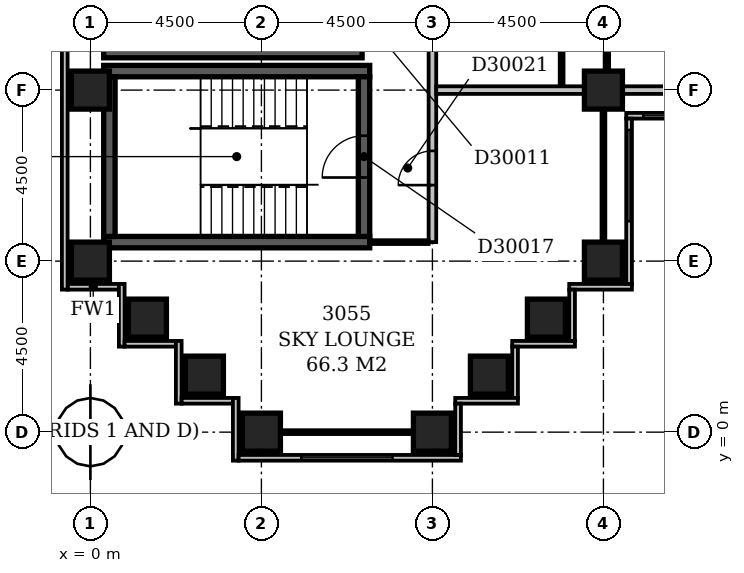
"""IFC4 building model, lengths in metres.
Left out: names, types, materials, properties, quantities, classifications, styles, units other than length and angle.
Written with IfcOpenShell. Run it as: python <this file> out.ifc"""

import sys

from ifc_helpers import new_model, si_unit, direction, frame, frame_2d, origin, origin_2d, place, context, subcontext, project, spatial, rectangle, extrude, element, fill, save


model = new_model("IFC4")
c1 = context("Model", 3, precision=1e-05, world=origin(), true_north=direction((0.0, 1.0)))
c2 = subcontext(c1, "Body", "Model", "MODEL_VIEW")
j1 = project(units=[si_unit("LENGTHUNIT", "METRE"), si_unit("PLANEANGLEUNIT", "RADIAN")], contexts=[c1])
p1 = place(None, origin())
s1 = spatial("IfcSite", under=j1, at=p1, CompositionType="ELEMENT")
p2 = place(p1, origin())
s2 = spatial("IfcBuilding", under=s1, at=p2, CompositionType="ELEMENT")
p3 = place(p2, frame((0.0, 0.0, 123.2)))
s3 = spatial("IfcBuildingStorey", under=s2, at=p3, CompositionType="ELEMENT", Elevation=123.2)
for number, where, z_axis, x_axis in (
    (1, (0.35, 5.0, -0.3), (0.0, 0.0, 1.0), (1.0, 0.0, 0.0)),
    (2, (0.35, 9.5, -0.3), (0.0, 0.0, 1.0), (1.0, 0.0, 0.0)),
):
    element("IfcWall", number, at=place(p3, frame(where, z_axis=z_axis, x_axis=x_axis)), inside=s3, PredefinedType="SHEAR", context=c2, shape_type="SweptSolid", body=[
        extrude(rectangle(XDim=7.0, YDim=0.3, at=frame_2d((3.5, 0.0))), origin(), (0.0, 0.0, 1.0), 3.6),
    ])
p4 = place(p3, frame((0.35, 10.0, -0.3), z_axis=(0.0, 0.0, 1.0), x_axis=(1.0, 0.0, 0.0)))
e3 = element("IfcWall", 3, at=p4, inside=s3, PredefinedType="SHEAR", context=c2, shape_type="SweptSolid", body=[
    extrude(rectangle(XDim=6.8, YDim=0.3, at=frame_2d((3.4, 0.0))), origin(), (0.0, 0.0, 1.0), 3.6),
])
p5 = place(p3, frame((0.5, 5.15, -0.3), z_axis=(0.0, 0.0, 1.0), x_axis=(0.0, 1.0, 0.0)))
e4 = element("IfcWall", 4, at=p5, inside=s3, PredefinedType="SHEAR", context=c2, shape_type="SweptSolid", body=[
    extrude(rectangle(XDim=4.2, YDim=0.3, at=frame_2d((2.1, 0.0))), origin(), (0.0, 0.0, 1.0), 3.6),
])
p6 = place(p3, frame((7.2, 5.15, -0.3), z_axis=(0.0, 0.0, 1.0), x_axis=(0.0, 1.0, 0.0)))
e5 = element("IfcWall", 5, at=p6, inside=s3, PredefinedType="SHEAR", context=c2, shape_type="SweptSolid", body=[
    extrude(rectangle(XDim=4.2, YDim=0.3, at=frame_2d((2.1, 0.0))), origin(), (0.0, 0.0, 1.0), 3.6),
])
p7 = place(p6, frame((1.55, 0.0, 0.3)))
e6 = element("IfcOpeningElement", 6, at=p7, cuts=e5, PredefinedType="OPENING", context=c2, shape_type="SweptSolid", body=[
    extrude(rectangle(XDim=1.1, YDim=2.1, at=frame_2d((0.55, 1.05))), frame((0.0, 0.162, 0.0), z_axis=(0.0, -1.0, 0.0), x_axis=(1.0, 0.0, 0.0)), (0.0, 0.0, 1.0), 0.324),
])
for number, where, z_axis, x_axis in (
    (7, (4.5, 0.0, -0.3), (0.0, 0.0, 1.0), (1.0, 0.0, 0.0)),
    (8, (9.0, 0.0, -0.3), (0.0, 0.0, 1.0), (1.0, 0.0, 0.0)),
    (9, (3.0, 1.5, -0.3), (0.0, 0.0, 1.0), (1.0, 0.0, 0.0)),
    (10, (10.5, 1.5, -0.3), (0.0, 0.0, 1.0), (1.0, 0.0, 0.0)),
    (11, (1.5, 3.0, -0.3), (0.0, 0.0, 1.0), (1.0, 0.0, 0.0)),
    (12, (12.0, 3.0, -0.3), (0.0, 0.0, 1.0), (1.0, 0.0, 0.0)),
    (13, (0.0, 4.5, -0.3), (0.0, 0.0, 1.0), (1.0, 0.0, 0.0)),
    (14, (13.5, 4.5, -0.3), (0.0, 0.0, 1.0), (1.0, 0.0, 0.0)),
    (15, (0.0, 9.0, -0.3), (0.0, 0.0, 1.0), (1.0, 0.0, 0.0)),
    (16, (13.5, 9.0, -0.3), (0.0, 0.0, 1.0), (1.0, 0.0, 0.0)),
):
    element("IfcColumn", number, at=place(p3, frame(where, z_axis=z_axis, x_axis=x_axis)), inside=s3, PredefinedType="COLUMN", context=c2, shape_type="SweptSolid", body=[
        extrude(rectangle(XDim=1.0, YDim=1.0, at=origin_2d()), origin(), (0.0, 0.0, 1.0), 3.6),
    ])
p8 = place(p3, frame((9.675, -0.6, 0.0), z_axis=(0.0, 0.0, 1.0), x_axis=(0.0, 1.0, 0.0)))
e17 = element("IfcWall", 17, at=p8, inside=s3, PredefinedType="STANDARD", context=c2, shape_type="SweptSolid", body=[
    extrude(rectangle(XDim=1.35, YDim=0.15, at=frame_2d((0.675, 0.0))), origin(), (0.0, 0.0, 1.0), 2.7),
])
p9 = place(p3, frame((9.6, 0.825, 0.0), z_axis=(0.0, 0.0, 1.0), x_axis=(1.0, 0.0, 0.0)))
e18 = element("IfcWall", 18, at=p9, inside=s3, PredefinedType="STANDARD", context=c2, shape_type="SweptSolid", body=[
    extrude(rectangle(XDim=1.65, YDim=0.15, at=frame_2d((0.825, 0.0))), origin(), (0.0, 0.0, 1.0), 2.7),
])
p10 = place(p3, frame((11.175, 0.9, 0.0), z_axis=(0.0, 0.0, 1.0), x_axis=(0.0, 1.0, 0.0)))
e19 = element("IfcWall", 19, at=p10, inside=s3, PredefinedType="STANDARD", context=c2, shape_type="SweptSolid", body=[
    extrude(rectangle(XDim=1.35, YDim=0.15, at=frame_2d((0.675, 0.0))), origin(), (0.0, 0.0, 1.0), 2.7),
])
p11 = place(p3, frame((11.1, 2.325, 0.0), z_axis=(0.0, 0.0, 1.0), x_axis=(1.0, 0.0, 0.0)))
e20 = element("IfcWall", 20, at=p11, inside=s3, PredefinedType="STANDARD", context=c2, shape_type="SweptSolid", body=[
    extrude(rectangle(XDim=1.65, YDim=0.15, at=frame_2d((0.825, 0.0))), origin(), (0.0, 0.0, 1.0), 2.7),
])
p12 = place(p3, frame((12.675, 2.4, 0.0), z_axis=(0.0, 0.0, 1.0), x_axis=(0.0, 1.0, 0.0)))
e21 = element("IfcWall", 21, at=p12, inside=s3, PredefinedType="STANDARD", context=c2, shape_type="SweptSolid", body=[
    extrude(rectangle(XDim=1.35, YDim=0.15, at=frame_2d((0.675, 0.0))), origin(), (0.0, 0.0, 1.0), 2.7),
])
p13 = place(p3, frame((12.6, 3.825, 0.0), z_axis=(0.0, 0.0, 1.0), x_axis=(1.0, 0.0, 0.0)))
e22 = element("IfcWall", 22, at=p13, inside=s3, PredefinedType="STANDARD", context=c2, shape_type="SweptSolid", body=[
    extrude(rectangle(XDim=1.65, YDim=0.15, at=frame_2d((0.825, 0.0))), origin(), (0.0, 0.0, 1.0), 2.7),
])
p14 = place(p3, frame((14.175, 3.9, 0.0), z_axis=(0.0, 0.0, 1.0), x_axis=(0.0, 1.0, 0.0)))
e23 = element("IfcWall", 23, at=p14, inside=s3, PredefinedType="STANDARD", context=c2, shape_type="SweptSolid", body=[
    extrude(rectangle(XDim=4.35, YDim=0.15, at=frame_2d((2.175, 0.0))), origin(), (0.0, 0.0, 1.0), 2.7),
])
p15 = place(p14, frame((1.65, 0.0, 0.6)))
e24 = element("IfcOpeningElement", 24, at=p15, cuts=e23, PredefinedType="OPENING", context=c2, shape_type="SweptSolid", body=[
    extrude(rectangle(XDim=2.4, YDim=1.8, at=frame_2d((1.2, 0.9))), frame((0.0, 0.087, 0.0), z_axis=(0.0, -1.0, 0.0), x_axis=(1.0, 0.0, 0.0)), (0.0, 0.0, 1.0), 0.174),
])
p16 = place(p3, frame((14.1, 8.325, 0.0), z_axis=(0.0, 0.0, 1.0), x_axis=(1.0, 0.0, 0.0)))
e25 = element("IfcWall", 25, at=p16, inside=s3, PredefinedType="STANDARD", context=c2, shape_type="SweptSolid", body=[
    extrude(rectangle(XDim=4.65, YDim=0.15, at=frame_2d((2.325, 0.0))), origin(), (0.0, 0.0, 1.0), 2.7),
])
p17 = place(p16, frame((0.45, 0.0, 0.6)))
e26 = element("IfcOpeningElement", 26, at=p17, cuts=e25, PredefinedType="OPENING", context=c2, shape_type="SweptSolid", body=[
    extrude(rectangle(XDim=2.4, YDim=1.8, at=frame_2d((1.2, 0.9))), frame((0.0, 0.087, 0.0), z_axis=(0.0, -1.0, 0.0), x_axis=(1.0, 0.0, 0.0)), (0.0, 0.0, 1.0), 0.174),
])
p18 = place(p3, frame((-0.675, 59.1, 0.0), z_axis=(0.0, 0.0, 1.0), x_axis=(0.0, -1.0, 0.0)))
e27 = element("IfcWall", 27, at=p18, inside=s3, PredefinedType="STANDARD", context=c2, shape_type="SweptSolid", body=[
    extrude(rectangle(XDim=55.35, YDim=0.15, at=frame_2d((27.675, 0.0))), origin(), (0.0, 0.0, 1.0), 2.7),
])
p19 = place(p18, frame((41.86, 0.0, 0.6)))
e28 = element("IfcOpeningElement", 28, at=p19, cuts=e27, PredefinedType="OPENING", context=c2, shape_type="SweptSolid", body=[
    extrude(rectangle(XDim=1.8, YDim=1.8, at=frame_2d((0.9, 0.9))), frame((0.0, 0.087, 0.0), z_axis=(0.0, -1.0, 0.0), x_axis=(1.0, 0.0, 0.0)), (0.0, 0.0, 1.0), 0.174),
])
p20 = place(p3, frame((-0.6, 3.825, 0.0), z_axis=(0.0, 0.0, 1.0), x_axis=(1.0, 0.0, 0.0)))
e29 = element("IfcWall", 29, at=p20, inside=s3, PredefinedType="STANDARD", context=c2, shape_type="SweptSolid", body=[
    extrude(rectangle(XDim=1.35, YDim=0.15, at=frame_2d((0.675, 0.0))), origin(), (0.0, 0.0, 1.0), 2.7),
])
p21 = place(p3, frame((0.825, 3.9, 0.0), z_axis=(0.0, 0.0, 1.0), x_axis=(0.0, -1.0, 0.0)))
e30 = element("IfcWall", 30, at=p21, inside=s3, PredefinedType="STANDARD", context=c2, shape_type="SweptSolid", body=[
    extrude(rectangle(XDim=1.65, YDim=0.15, at=frame_2d((0.825, 0.0))), origin(), (0.0, 0.0, 1.0), 2.7),
])
p22 = place(p3, frame((0.9, 2.325, 0.0), z_axis=(0.0, 0.0, 1.0), x_axis=(1.0, 0.0, 0.0)))
e31 = element("IfcWall", 31, at=p22, inside=s3, PredefinedType="STANDARD", context=c2, shape_type="SweptSolid", body=[
    extrude(rectangle(XDim=1.35, YDim=0.15, at=frame_2d((0.675, 0.0))), origin(), (0.0, 0.0, 1.0), 2.7),
])
p23 = place(p3, frame((2.325, 2.4, 0.0), z_axis=(0.0, 0.0, 1.0), x_axis=(0.0, -1.0, 0.0)))
e32 = element("IfcWall", 32, at=p23, inside=s3, PredefinedType="STANDARD", context=c2, shape_type="SweptSolid", body=[
    extrude(rectangle(XDim=1.65, YDim=0.15, at=frame_2d((0.825, 0.0))), origin(), (0.0, 0.0, 1.0), 2.7),
])
p24 = place(p3, frame((2.4, 0.825, 0.0), z_axis=(0.0, 0.0, 1.0), x_axis=(1.0, 0.0, 0.0)))
e33 = element("IfcWall", 33, at=p24, inside=s3, PredefinedType="STANDARD", context=c2, shape_type="SweptSolid", body=[
    extrude(rectangle(XDim=1.35, YDim=0.15, at=frame_2d((0.675, 0.0))), origin(), (0.0, 0.0, 1.0), 2.7),
])
p25 = place(p3, frame((3.825, 0.9, 0.0), z_axis=(0.0, 0.0, 1.0), x_axis=(0.0, -1.0, 0.0)))
e34 = element("IfcWall", 34, at=p25, inside=s3, PredefinedType="STANDARD", context=c2, shape_type="SweptSolid", body=[
    extrude(rectangle(XDim=1.65, YDim=0.15, at=frame_2d((0.825, 0.0))), origin(), (0.0, 0.0, 1.0), 2.7),
])
p26 = place(p3, frame((3.9, -0.675, 0.0), z_axis=(0.0, 0.0, 1.0), x_axis=(1.0, 0.0, 0.0)))
e35 = element("IfcWall", 35, at=p26, inside=s3, PredefinedType="STANDARD", context=c2, shape_type="SweptSolid", body=[
    extrude(rectangle(XDim=5.85, YDim=0.15, at=frame_2d((2.925, 0.0))), origin(), (0.0, 0.0, 1.0), 2.7),
])
p27 = place(p26, frame((1.65, 0.0, 0.6)))
e36 = element("IfcOpeningElement", 36, at=p27, cuts=e35, PredefinedType="OPENING", context=c2, shape_type="SweptSolid", body=[
    extrude(rectangle(XDim=2.4, YDim=1.8, at=frame_2d((1.2, 0.9))), frame((0.0, 0.087, 0.0), z_axis=(0.0, -1.0, 0.0), x_axis=(1.0, 0.0, 0.0)), (0.0, 0.0, 1.0), 0.174),
])
p28 = place(p3, frame((5.0, 0.0, 0.0), z_axis=(0.0, 0.0, 1.0), x_axis=(1.0, 0.0, 0.0)))
e37 = element("IfcWall", 37, at=p28, inside=s3, PredefinedType="PARTITIONING", context=c2, shape_type="SweptSolid", body=[
    extrude(rectangle(XDim=3.5, YDim=0.1, at=frame_2d((1.75, 0.0))), origin(), (0.0, 0.0, 1.0), 2.7),
])
p29 = place(p3, frame((0.0, 4.5, 0.0), z_axis=(0.0, 0.0, 1.0), x_axis=(0.0, 1.0, 0.0)))
e38 = element("IfcWall", 38, at=p29, inside=s3, PredefinedType="PARTITIONING", context=c2, shape_type="SweptSolid", body=[
    extrude(rectangle(XDim=0.5, YDim=0.1, at=frame_2d((0.25, 0.0))), origin(), (0.0, 0.0, 1.0), 2.7),
])
p30 = place(p3, frame((7.349, 5.0, 0.0), z_axis=(0.0, 0.0, 1.0), x_axis=(1.0, 0.0, 0.0)))
e39 = element("IfcWall", 39, at=p30, inside=s3, PredefinedType="PARTITIONING", context=c2, shape_type="SweptSolid", body=[
    extrude(rectangle(XDim=1.551, YDim=0.1, at=frame_2d((0.775, 0.0))), origin(), (0.0, 0.0, 1.0), 3.3),
])
p31 = place(p3, frame((9.0, 5.0, 0.0), z_axis=(0.0, 0.0, 1.0), x_axis=(0.0, 1.0, 0.0)))
e40 = element("IfcWall", 40, at=p31, inside=s3, PredefinedType="PARTITIONING", context=c2, shape_type="SweptSolid", body=[
    extrude(rectangle(XDim=27.75, YDim=0.2, at=frame_2d((13.875, 0.0))), origin(), (0.0, 0.0, 1.0), 3.3),
])
p32 = place(p31, frame((17.8, 0.0, 0.0)))
e41 = element("IfcOpeningElement", 41, at=p32, cuts=e40, PredefinedType="OPENING", context=c2, shape_type="SweptSolid", body=[
    extrude(rectangle(XDim=1.0, YDim=2.1, at=frame_2d((0.5, 1.05))), frame((0.0, 0.112, 0.0), z_axis=(0.0, -1.0, 0.0), x_axis=(1.0, 0.0, 0.0)), (0.0, 0.0, 1.0), 0.224),
])
p33 = place(p31, frame((14.95, 0.0, 0.0)))
e42 = element("IfcOpeningElement", 42, at=p33, cuts=e40, PredefinedType="OPENING", context=c2, shape_type="SweptSolid", body=[
    extrude(rectangle(XDim=1.0, YDim=2.1, at=frame_2d((0.5, 1.05))), frame((0.0, 0.112, 0.0), z_axis=(0.0, -1.0, 0.0), x_axis=(1.0, 0.0, 0.0)), (0.0, 0.0, 1.0), 0.224),
])
p34 = place(p31, frame((9.3, 0.0, 0.0)))
e43 = element("IfcOpeningElement", 43, at=p34, cuts=e40, PredefinedType="OPENING", context=c2, shape_type="SweptSolid", body=[
    extrude(rectangle(XDim=1.0, YDim=2.1, at=frame_2d((0.5, 1.05))), frame((0.0, 0.112, 0.0), z_axis=(0.0, -1.0, 0.0), x_axis=(1.0, 0.0, 0.0)), (0.0, 0.0, 1.0), 0.224),
])
p35 = place(p31, frame((1.5, 0.0, 0.0)))
e44 = element("IfcOpeningElement", 44, at=p35, cuts=e40, PredefinedType="OPENING", context=c2, shape_type="SweptSolid", body=[
    extrude(rectangle(XDim=0.9, YDim=2.1, at=frame_2d((0.45, 1.05))), frame((0.0, 0.112, 0.0), z_axis=(0.0, -1.0, 0.0), x_axis=(1.0, 0.0, 0.0)), (0.0, 0.0, 1.0), 0.224),
])
p36 = place(p3, frame((13.5, 5.0, 0.0), z_axis=(0.0, 0.0, 1.0), x_axis=(0.0, 1.0, 0.0)))
e45 = element("IfcWall", 45, at=p36, inside=s3, PredefinedType="PARTITIONING", context=c2, shape_type="SweptSolid", body=[
    extrude(rectangle(XDim=3.5, YDim=0.1, at=frame_2d((1.75, 0.0))), origin(), (0.0, 0.0, 1.0), 2.7),
])
p37 = place(p3, frame((9.1, 9.0, 0.0), z_axis=(0.0, 0.0, 1.0), x_axis=(1.0, 0.0, 0.0)))
e46 = element("IfcWall", 46, at=p37, inside=s3, PredefinedType="PARTITIONING", context=c2, shape_type="SweptSolid", body=[
    extrude(rectangle(XDim=3.9, YDim=0.2, at=frame_2d((1.95, 0.0))), origin(), (0.0, 0.0, 1.0), 3.3),
])
p38 = place(p3, frame((14.0, 9.0, 0.0), z_axis=(0.0, 0.0, 1.0), x_axis=(1.0, 0.0, 0.0)))
e47 = element("IfcWall", 47, at=p38, inside=s3, PredefinedType="PARTITIONING", context=c2, shape_type="SweptSolid", body=[
    extrude(rectangle(XDim=3.5, YDim=0.2, at=frame_2d((1.75, 0.0))), origin(), (0.0, 0.0, 1.0), 2.7),
])
p39 = place(p3, frame((12.4, 9.1, 0.0), z_axis=(0.0, 0.0, 1.0), x_axis=(0.0, 1.0, 0.0)))
e48 = element("IfcWall", 48, at=p39, inside=s3, PredefinedType="PARTITIONING", context=c2, shape_type="SweptSolid", body=[
    extrude(rectangle(XDim=4.9, YDim=0.1, at=frame_2d((2.45, 0.0))), origin(), (0.0, 0.0, 1.0), 3.3),
])
p40 = place(p39, frame((1.95, 0.0, 0.0)))
e49 = element("IfcOpeningElement", 49, at=p40, cuts=e48, PredefinedType="OPENING", context=c2, shape_type="SweptSolid", body=[
    extrude(rectangle(XDim=0.9, YDim=2.1, at=frame_2d((0.45, 1.05))), frame((0.0, 0.062, 0.0), z_axis=(0.0, -1.0, 0.0), x_axis=(1.0, 0.0, 0.0)), (0.0, 0.0, 1.0), 0.124),
])
p41 = place(p3, frame((13.6, 9.5, 0.0), z_axis=(0.0, 0.0, 1.0), x_axis=(0.0, 1.0, 0.0)))
e50 = element("IfcWall", 50, at=p41, inside=s3, PredefinedType="PARTITIONING", context=c2, shape_type="SweptSolid", body=[
    extrude(rectangle(XDim=8.4, YDim=0.1, at=frame_2d((4.2, 0.0))), origin(), (0.0, 0.0, 1.0), 3.3),
])
p42 = place(p41, frame((1.3, 0.0, 0.0)))
e51 = element("IfcOpeningElement", 51, at=p42, cuts=e50, PredefinedType="OPENING", context=c2, shape_type="SweptSolid", body=[
    extrude(rectangle(XDim=0.9, YDim=2.1, at=frame_2d((0.45, 1.05))), frame((0.0, 0.062, 0.0), z_axis=(0.0, -1.0, 0.0), x_axis=(1.0, 0.0, 0.0)), (0.0, 0.0, 1.0), 0.124),
])
p43 = place(p41, frame((5.8, 0.0, 0.0)))
e52 = element("IfcOpeningElement", 52, at=p43, cuts=e50, PredefinedType="OPENING", context=c2, shape_type="SweptSolid", body=[
    extrude(rectangle(XDim=0.9, YDim=2.1, at=frame_2d((0.45, 1.05))), frame((0.0, 0.062, 0.0), z_axis=(0.0, -1.0, 0.0), x_axis=(1.0, 0.0, 0.0)), (0.0, 0.0, 1.0), 0.124),
])
p44 = place(p15, origin())
e53 = element("IfcWindow", 53, at=p44, inside=s3, PartitioningType="SINGLE_PANEL", PredefinedType="WINDOW", context=c2, shape_type="SweptSolid", body=[
    extrude(rectangle(XDim=2.4, YDim=1.8, at=frame_2d((1.2, 0.9))), frame((0.0, 0.03, 0.0), z_axis=(0.0, -1.0, 0.0), x_axis=(1.0, 0.0, 0.0)), (0.0, 0.0, 1.0), 0.06),
])
fill(e24, e53)
p45 = place(p17, origin())
e54 = element("IfcWindow", 54, at=p45, inside=s3, PartitioningType="SINGLE_PANEL", PredefinedType="WINDOW", context=c2, shape_type="SweptSolid", body=[
    extrude(rectangle(XDim=2.4, YDim=1.8, at=frame_2d((1.2, 0.9))), frame((0.0, 0.03, 0.0), z_axis=(0.0, -1.0, 0.0), x_axis=(1.0, 0.0, 0.0)), (0.0, 0.0, 1.0), 0.06),
])
fill(e26, e54)
p46 = place(p27, origin())
e55 = element("IfcWindow", 55, at=p46, inside=s3, PartitioningType="SINGLE_PANEL", PredefinedType="WINDOW", context=c2, shape_type="SweptSolid", body=[
    extrude(rectangle(XDim=2.4, YDim=1.8, at=frame_2d((1.2, 0.9))), frame((0.0, 0.03, 0.0), z_axis=(0.0, -1.0, 0.0), x_axis=(1.0, 0.0, 0.0)), (0.0, 0.0, 1.0), 0.06),
])
fill(e36, e55)
p47 = place(p7, origin())
e56 = element("IfcDoor", 56, at=p47, inside=s3, OperationType="SINGLE_SWING_LEFT", PredefinedType="DOOR", context=c2, shape_type="SweptSolid", body=[
    extrude(rectangle(XDim=1.1, YDim=2.1, at=frame_2d((0.55, 1.05))), frame((0.0, 0.025, 0.0), z_axis=(0.0, -1.0, 0.0), x_axis=(1.0, 0.0, 0.0)), (0.0, 0.0, 1.0), 0.05),
])
fill(e6, e56)
p48 = place(p35, origin())
e57 = element("IfcDoor", 57, at=p48, inside=s3, OperationType="SINGLE_SWING_LEFT", PredefinedType="DOOR", context=c2, shape_type="SweptSolid", body=[
    extrude(rectangle(XDim=0.9, YDim=2.1, at=frame_2d((0.45, 1.05))), frame((0.0, 0.025, 0.0), z_axis=(0.0, -1.0, 0.0), x_axis=(1.0, 0.0, 0.0)), (0.0, 0.0, 1.0), 0.05),
])
fill(e44, e57)
save(model, sys.argv[1])
